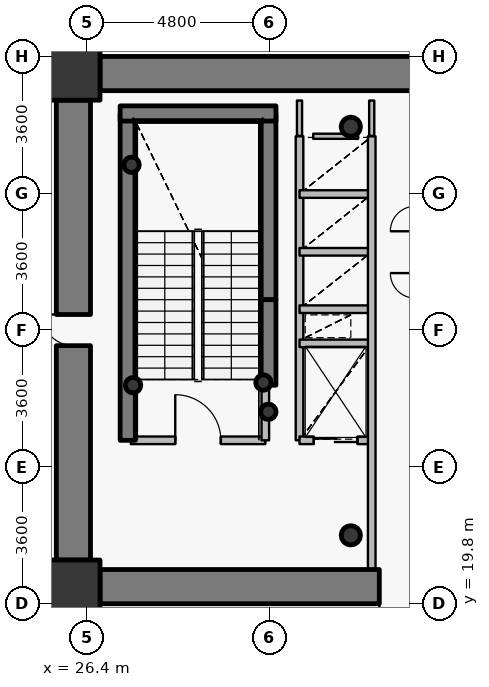
"""IFC4 building model, lengths in metres.
Left out: names, types, materials, properties, quantities, classifications, styles, units other than length and angle.
Written with IfcOpenShell. Run it as: python <this file> out.ifc"""

import sys

from ifc_helpers import new_model, si_unit, direction, frame, frame_2d, origin, origin_2d, place, context, subcontext, project, spatial, rectangle, hollow_circle, extrude, source, transform, mapped, element, fill, save


model = new_model("IFC4")
c1 = context("Model", 3, precision=1e-05, world=origin(), true_north=direction((0.0, 1.0)))
c2 = subcontext(c1, "Body", "Model", "MODEL_VIEW")
j1 = project(units=[si_unit("LENGTHUNIT", "METRE"), si_unit("PLANEANGLEUNIT", "RADIAN")], contexts=[c1])
p1 = place(None, origin())
s1 = spatial("IfcSite", under=j1, at=p1, CompositionType="ELEMENT")
p2 = place(p1, origin())
s2 = spatial("IfcBuilding", under=s1, at=p2, CompositionType="ELEMENT")
p3 = place(p2, frame((0.0, 0.0, 61.8)))
s3 = spatial("IfcBuildingStorey", under=s2, at=p3, CompositionType="ELEMENT", Elevation=61.8)
for number, where, z_axis, x_axis in (
    (1, (26.05, 20.25, 0.0), (0.0, 0.0, 1.0), (1.0, 0.0, 0.0)),
    (2, (26.05, 33.75, 0.0), (0.0, 0.0, 1.0), (1.0, 0.0, 0.0)),
):
    element("IfcColumn", number, at=place(p3, frame(where, z_axis=z_axis, x_axis=x_axis)), inside=s3, PredefinedType="COLUMN", context=c2, shape_type="SweptSolid", body=[
        extrude(rectangle(XDim=1.4, YDim=1.4, at=origin_2d()), origin(), (0.0, 0.0, 1.0), 4.2),
    ])
for number, where, z_axis, x_axis in (
    (3, (33.35, 21.6, 0.0), (0.0, 0.0, 1.0), (1.0, 0.0, 0.0)),
    (4, (33.35, 32.35, 0.0), (0.0, 0.0, 1.0), (1.0, 0.0, 0.0)),
):
    element("IfcColumn", number, at=place(p3, frame(where, z_axis=z_axis, x_axis=x_axis)), inside=s3, PredefinedType="COLUMN", context=c2, shape_type="SweptSolid", body=[
        extrude(hollow_circle(Radius=0.254, WallThickness=0.02, at=origin_2d()), origin(), (0.0, 0.0, 1.0), 4.2),
    ])
p4 = place(p3, frame((27.48, 24.1, 0.0), z_axis=(0.0, 0.0, 1.0), x_axis=(0.0, 1.0, 0.0)))
e5 = element("IfcWall", 5, at=p4, inside=s3, PredefinedType="SHEAR", context=c2, shape_type="SweptSolid", body=[
    extrude(rectangle(XDim=8.6, YDim=0.4, at=frame_2d((4.3, 0.0))), origin(), (0.0, 0.0, 1.0), 4.2),
])
p5 = place(p3, frame((31.18, 27.8, 0.0), z_axis=(0.0, 0.0, 1.0), x_axis=(0.0, 1.0, 0.0)))
e6 = element("IfcWall", 6, at=p5, inside=s3, PredefinedType="SHEAR", context=c2, shape_type="SweptSolid", body=[
    extrude(rectangle(XDim=4.9, YDim=0.4, at=frame_2d((2.45, 0.0))), origin(), (0.0, 0.0, 1.0), 4.2),
])
p6 = place(p3, frame((27.28, 32.7, 0.0), z_axis=(0.0, 0.0, 1.0), x_axis=(1.0, 0.0, 0.0)))
e7 = element("IfcWall", 7, at=p6, inside=s3, PredefinedType="SHEAR", context=c2, shape_type="SweptSolid", body=[
    extrude(rectangle(XDim=4.1, YDim=0.4, at=frame_2d((2.05, 0.0))), origin(), (0.0, 0.0, 1.0), 4.2),
])
for number, where, z_axis, x_axis in (
    (8, (27.58, 31.35, 0.0), (0.0, 0.0, 1.0), (1.0, 0.0, 0.0)),
    (9, (31.05, 25.62, 0.0), (0.0, 0.0, 1.0), (1.0, 0.0, 0.0)),
    (10, (31.18, 24.85, 0.0), (0.0, 0.0, 1.0), (1.0, 0.0, 0.0)),
    (11, (27.62, 25.55, 0.0), (0.0, 0.0, 1.0), (1.0, 0.0, 0.0)),
):
    element("IfcColumn", number, at=place(p3, frame(where, z_axis=z_axis, x_axis=x_axis)), inside=s3, PredefinedType="COLUMN", context=c2, shape_type="SweptSolid", body=[
        extrude(hollow_circle(Radius=0.203, WallThickness=0.016, at=origin_2d()), origin(), (0.0, 0.0, 1.0), 4.2),
    ])
p7 = place(p3, frame((26.75, 33.75, 0.0), z_axis=(0.0, 0.0, 1.0), x_axis=(1.0, 0.0, 0.0)))
e12 = element("IfcWall", 12, at=p7, inside=s3, PredefinedType="SHEAR", context=c2, shape_type="SweptSolid", body=[
    extrude(rectangle(XDim=18.5, YDim=0.9, at=frame_2d((9.25, 0.0))), origin(), (0.0, 0.0, 1.0), 3.4),
])
p8 = place(p3, frame((45.25, 20.25, 0.0), z_axis=(0.0, 0.0, 1.0), x_axis=(-1.0, 0.0, 0.0)))
e13 = element("IfcWall", 13, at=p8, inside=s3, PredefinedType="SHEAR", context=c2, shape_type="SweptSolid", body=[
    extrude(rectangle(XDim=18.5, YDim=0.9, at=frame_2d((9.25, 0.0))), origin(), (0.0, 0.0, 1.0), 3.4),
])
p9 = place(p8, frame((10.0, 0.0, 0.0)))
e14 = element("IfcOpeningElement", 14, at=p9, cuts=e13, PredefinedType="OPENING", context=c2, shape_type="SweptSolid", body=[
    extrude(rectangle(XDim=1.15, YDim=2.15, at=origin_2d()), frame((0.575, 0.46, 1.075), z_axis=(0.0, -1.0, 0.0), x_axis=(1.0, 0.0, 0.0)), (0.0, 0.0, 1.0), 0.92),
])
p10 = place(p3, frame((26.05, 20.95, 0.0), z_axis=(0.0, 0.0, 1.0), x_axis=(0.0, 1.0, 0.0)))
e15 = element("IfcWall", 15, at=p10, inside=s3, PredefinedType="SHEAR", context=c2, shape_type="SweptSolid", body=[
    extrude(rectangle(XDim=12.1, YDim=0.9, at=frame_2d((6.05, 0.0))), origin(), (0.0, 0.0, 1.0), 3.4),
])
p11 = place(p10, frame((5.64, 0.0, 0.0)))
e16 = element("IfcOpeningElement", 16, at=p11, cuts=e15, PredefinedType="OPENING", context=c2, shape_type="SweptSolid", body=[
    extrude(rectangle(XDim=0.82, YDim=2.1, at=origin_2d()), frame((0.41, 0.46, 1.05), z_axis=(0.0, -1.0, 0.0), x_axis=(1.0, 0.0, 0.0)), (0.0, 0.0, 1.0), 0.92),
])
p12 = place(p3, frame((31.18, 25.55, 0.0), z_axis=(0.0, 0.0, 1.0), x_axis=(0.0, 1.0, 0.0)))
e17 = element("IfcWall", 17, at=p12, inside=s3, PredefinedType="SHEAR", context=c2, shape_type="SweptSolid", body=[
    extrude(rectangle(XDim=2.25, YDim=0.4, at=frame_2d((1.125, 0.0))), origin(), (0.0, 0.0, 1.0), 3.55),
])
p13 = place(p3, frame((27.56, 24.1, 0.0), z_axis=(0.0, 0.0, 1.0), x_axis=(1.0, 0.0, 0.0)))
e18 = element("IfcWall", 18, at=p13, inside=s3, PredefinedType="PARTITIONING", context=c2, shape_type="SweptSolid", body=[
    extrude(rectangle(XDim=3.54, YDim=0.2, at=frame_2d((1.77, 0.0))), origin(), (0.0, 0.0, 1.0), 3.95),
])
p14 = place(p13, frame((1.17, 0.0, 0.0)))
e19 = element("IfcOpeningElement", 19, at=p14, cuts=e18, PredefinedType="OPENING", context=c2, shape_type="SweptSolid", body=[
    extrude(rectangle(XDim=1.2, YDim=2.15, at=origin_2d()), frame((0.6, 0.11, 1.075), z_axis=(0.0, -1.0, 0.0), x_axis=(1.0, 0.0, 0.0)), (0.0, 0.0, 1.0), 0.22),
])
p15 = place(p3, frame((31.1, 24.1, 0.0), z_axis=(0.0, 0.0, 1.0), x_axis=(0.0, 1.0, 0.0)))
e20 = element("IfcWall", 20, at=p15, inside=s3, PredefinedType="PARTITIONING", context=c2, shape_type="SweptSolid", body=[
    extrude(rectangle(XDim=1.44, YDim=0.2, at=frame_2d((0.72, 0.0))), origin(), (0.0, 0.0, 1.0), 3.95),
])
p16 = place(p3, frame((32.0, 24.1, 0.0), z_axis=(0.0, 0.0, 1.0), x_axis=(0.0, 1.0, 0.0)))
e21 = element("IfcWall", 21, at=p16, inside=s3, PredefinedType="PARTITIONING", context=c2, shape_type="SweptSolid", body=[
    extrude(rectangle(XDim=8.0, YDim=0.2, at=frame_2d((4.0, 0.0))), origin(), (0.0, 0.0, 1.0), 3.95),
])
p17 = place(p3, frame((32.0, 24.1, 0.0), z_axis=(0.0, 0.0, 1.0), x_axis=(1.0, 0.0, 0.0)))
e22 = element("IfcWall", 22, at=p17, inside=s3, PredefinedType="PARTITIONING", context=c2, shape_type="SweptSolid", body=[
    extrude(rectangle(XDim=1.9, YDim=0.2, at=frame_2d((0.95, 0.0))), origin(), (0.0, 0.0, 1.0), 3.535),
])
p18 = place(p17, frame((0.375, 0.0, 0.0)))
e23 = element("IfcOpeningElement", 23, at=p18, cuts=e22, PredefinedType="OPENING", context=c2, shape_type="SweptSolid", body=[
    extrude(rectangle(XDim=1.15, YDim=2.15, at=origin_2d()), frame((0.575, 0.11, 1.075), z_axis=(0.0, -1.0, 0.0), x_axis=(1.0, 0.0, 0.0)), (0.0, 0.0, 1.0), 0.22),
])
for number, where, z_axis, x_axis in (
    (24, (32.0, 26.65, 0.0), (0.0, 0.0, 1.0), (1.0, 0.0, 0.0)),
    (25, (32.0, 27.55, 0.0), (0.0, 0.0, 1.0), (1.0, 0.0, 0.0)),
    (26, (32.0, 29.06, 0.0), (0.0, 0.0, 1.0), (1.0, 0.0, 0.0)),
    (27, (32.0, 30.58, 0.0), (0.0, 0.0, 1.0), (1.0, 0.0, 0.0)),
):
    element("IfcWall", number, at=place(p3, frame(where, z_axis=z_axis, x_axis=x_axis)), inside=s3, PredefinedType="PARTITIONING", context=c2, shape_type="SweptSolid", body=[
        extrude(rectangle(XDim=1.9, YDim=0.2, at=frame_2d((0.95, 0.0))), origin(), (0.0, 0.0, 1.0), 3.535),
    ])
p19 = place(p3, frame((33.9, 20.7, 0.0), z_axis=(0.0, 0.0, 1.0), x_axis=(0.0, 1.0, 0.0)))
e28 = element("IfcWall", 28, at=p19, inside=s3, PredefinedType="PARTITIONING", context=c2, shape_type="SweptSolid", body=[
    extrude(rectangle(XDim=11.4, YDim=0.2, at=frame_2d((5.7, 0.0))), origin(), (0.0, 0.0, 1.0), 3.535),
])
p20 = place(p3, frame((32.36, 32.1, 0.0), z_axis=(0.0, 0.0, 1.0), x_axis=(1.0, 0.0, 0.0)))
e29 = element("IfcWall", 29, at=p20, inside=s3, PredefinedType="PARTITIONING", context=c2, shape_type="SweptSolid", body=[
    extrude(rectangle(XDim=1.18, YDim=0.135, at=frame_2d((0.59, 0.0))), origin(), (0.0, 0.0, 1.0), 3.535),
])
p21 = place(p3, frame((32.0, 33.04, 0.0), z_axis=(0.0, 0.0, 1.0), x_axis=(0.0, -1.0, 0.0)))
e30 = element("IfcWall", 30, at=p21, inside=s3, PredefinedType="PARTITIONING", context=c2, shape_type="SweptSolid", body=[
    extrude(rectangle(XDim=0.93, YDim=0.135, at=frame_2d((0.465, 0.0))), origin(), (0.0, 0.0, 1.0), 3.485),
])
p22 = place(p3, frame((33.9, 32.11, 0.0), z_axis=(0.0, 0.0, 1.0), x_axis=(0.0, 1.0, 0.0)))
e31 = element("IfcWall", 31, at=p22, inside=s3, PredefinedType="PARTITIONING", context=c2, shape_type="SweptSolid", body=[
    extrude(rectangle(XDim=0.93, YDim=0.135, at=frame_2d((0.465, 0.0))), origin(), (0.0, 0.0, 1.0), 3.535),
])
p23 = place(p3, frame((26.74, 34.2, 0.0), z_axis=(0.0, 0.0, 1.0), x_axis=(-1.0, 0.0, 0.0)))
e32 = element("IfcWall", 32, at=p23, inside=s3, PredefinedType="PARTITIONING", context=c2, shape_type="SweptSolid", body=[
    extrude(rectangle(XDim=1.14, YDim=0.135, at=frame_2d((0.57, 0.0))), origin(), (0.0, 0.0, 1.0), 3.285),
])
p24 = place(p3, frame((25.6, 33.893, 0.0), z_axis=(0.0, 0.0, 1.0), x_axis=(0.0, -1.0, 0.0)))
e33 = element("IfcWall", 33, at=p24, inside=s3, PredefinedType="PARTITIONING", context=c2, shape_type="SweptSolid", body=[
    extrude(rectangle(XDim=0.833, YDim=0.135, at=frame_2d((0.416, 0.0))), origin(), (0.0, 0.0, 1.0), 3.95),
])
p25 = place(p3, frame((25.6, 20.94, 0.0), z_axis=(0.0, 0.0, 1.0), x_axis=(0.0, -1.0, 0.0)))
e34 = element("IfcWall", 34, at=p25, inside=s3, PredefinedType="PARTITIONING", context=c2, shape_type="SweptSolid", body=[
    extrude(rectangle(XDim=1.14, YDim=0.135, at=frame_2d((0.57, 0.0))), origin(), (0.0, 0.0, 1.0), 3.95),
])
p26 = place(p3, frame((25.907, 19.8, 0.0), z_axis=(0.0, 0.0, 1.0), x_axis=(1.0, 0.0, 0.0)))
e35 = element("IfcWall", 35, at=p26, inside=s3, PredefinedType="PARTITIONING", context=c2, shape_type="SweptSolid", body=[
    extrude(rectangle(XDim=0.833, YDim=0.135, at=frame_2d((0.416, 0.0))), origin(), (0.0, 0.0, 1.0), 3.285),
])
m1 = source(origin(), c2, "Body", "SweptSolid", [
    extrude(rectangle(XDim=0.82, YDim=2.1, at=origin_2d()), frame((0.41, 0.025, 1.05), z_axis=(0.0, -1.0, 0.0), x_axis=(1.0, 0.0, 0.0)), (0.0, 0.0, 1.0), 0.05),
])
p27 = place(p11, origin())
e36 = element("IfcDoor", 36, at=p27, inside=s3, OperationType="SINGLE_SWING_RIGHT", PredefinedType="DOOR", context=c2, shape_type="MappedRepresentation", body=[
    mapped(m1, transform((0.0, 0.0, 0.0), x_axis=(1.0, 0.0, 0.0), y_axis=(0.0, 1.0, 0.0), z_axis=(0.0, 0.0, 1.0), scale=1.0)),
])
fill(e16, e36)
m2 = source(origin(), c2, "Body", "SweptSolid", [
    extrude(rectangle(XDim=1.15, YDim=2.15, at=origin_2d()), frame((0.575, 0.025, 1.075), z_axis=(0.0, -1.0, 0.0), x_axis=(1.0, 0.0, 0.0)), (0.0, 0.0, 1.0), 0.05),
])
p28 = place(p9, origin())
e37 = element("IfcDoor", 37, at=p28, inside=s3, OperationType="SINGLE_SWING_RIGHT", PredefinedType="DOOR", context=c2, shape_type="MappedRepresentation", body=[
    mapped(m2, transform((0.0, 0.0, 0.0), x_axis=(1.0, 0.0, 0.0), y_axis=(0.0, 1.0, 0.0), z_axis=(0.0, 0.0, 1.0), scale=1.0)),
])
fill(e14, e37)
m3 = source(origin(), c2, "Body", "SweptSolid", [
    extrude(rectangle(XDim=1.2, YDim=2.15, at=origin_2d()), frame((0.6, 0.025, 1.075), z_axis=(0.0, -1.0, 0.0), x_axis=(1.0, 0.0, 0.0)), (0.0, 0.0, 1.0), 0.05),
])
p29 = place(p14, origin())
e38 = element("IfcDoor", 38, at=p29, inside=s3, OperationType="SINGLE_SWING_LEFT", PredefinedType="DOOR", context=c2, shape_type="MappedRepresentation", body=[
    mapped(m3, transform((0.0, 0.0, 0.0), x_axis=(1.0, 0.0, 0.0), y_axis=(0.0, 1.0, 0.0), z_axis=(0.0, 0.0, 1.0), scale=1.0)),
])
fill(e19, e38)
m4 = source(origin(), c2, "Body", "SweptSolid", [
    extrude(rectangle(XDim=1.15, YDim=2.15, at=origin_2d()), frame((0.575, 0.025, 1.075), z_axis=(0.0, -1.0, 0.0), x_axis=(1.0, 0.0, 0.0)), (0.0, 0.0, 1.0), 0.05),
])
p30 = place(p18, origin())
e39 = element("IfcDoor", 39, at=p30, inside=s3, OperationType="DOUBLE_DOOR_SLIDING", PredefinedType="USERDEFINED", context=c2, shape_type="MappedRepresentation", body=[
    mapped(m4, transform((0.0, 0.0, 0.0), x_axis=(1.0, 0.0, 0.0), y_axis=(0.0, 1.0, 0.0), z_axis=(0.0, 0.0, 1.0), scale=1.0)),
])
fill(e23, e39)
save(model, sys.argv[1])
